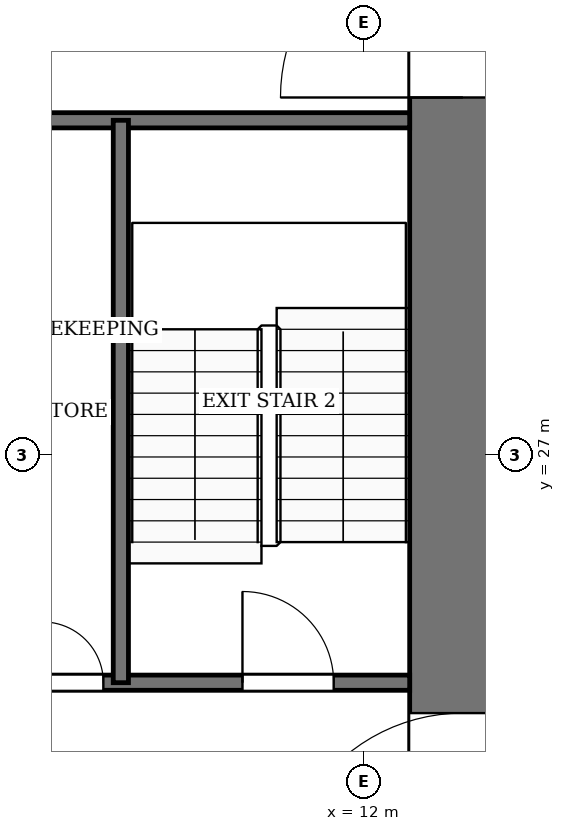
"""IFC4 building model, lengths in metres.
Left out: names, types, materials, properties, quantities, classifications, styles, units other than length and angle.
Written with IfcOpenShell. Run it as: python <this file> out.ifc"""

import sys

from ifc_helpers import new_model, si_unit, direction, frame, frame_2d, origin, place, context, subcontext, project, spatial, rectangle, extrude, element, fill, save


model = new_model("IFC4")
c1 = context("Model", 3, precision=1e-05, world=origin(), true_north=direction((0.0, 1.0)))
c2 = subcontext(c1, "Body", "Model", "MODEL_VIEW")
j1 = project(units=[si_unit("LENGTHUNIT", "METRE"), si_unit("PLANEANGLEUNIT", "RADIAN")], contexts=[c1])
p1 = place(None, origin())
s1 = spatial("IfcSite", under=j1, at=p1, CompositionType="ELEMENT")
p2 = place(p1, origin())
s2 = spatial("IfcBuilding", under=s1, at=p2, CompositionType="ELEMENT")
p3 = place(p2, frame((0.0, 0.0, 54.0)))
s3 = spatial("IfcBuildingStorey", under=s2, at=p3, CompositionType="ELEMENT", Elevation=54.0)
p4 = place(p3, frame((13.3, 18.4, -0.13), z_axis=(0.0, 0.0, 1.0), x_axis=(0.0, 1.0, 0.0)))
e1 = element("IfcWall", 1, at=p4, inside=s3, PredefinedType="SHEAR", context=c2, shape_type="SweptSolid", body=[
    extrude(rectangle(XDim=19.2, YDim=1.4, at=frame_2d((9.6, 0.0))), origin(), (0.0, 0.0, 1.0), 3.88),
])
p5 = place(p4, frame((2.8, 0.0, 0.13)))
e2 = element("IfcOpeningElement", 2, at=p5, cuts=e1, PredefinedType="OPENING", context=c2, shape_type="SweptSolid", body=[
    extrude(rectangle(XDim=2.4, YDim=2.4, at=frame_2d((1.2, 1.2))), frame((0.0, 0.71, 0.0), z_axis=(0.0, -1.0, 0.0), x_axis=(1.0, 0.0, 0.0)), (0.0, 0.0, 1.0), 1.42),
])
p6 = place(p4, frame((13.3, 0.0, 0.13)))
e3 = element("IfcOpeningElement", 3, at=p6, cuts=e1, PredefinedType="OPENING", context=c2, shape_type="SweptSolid", body=[
    extrude(rectangle(XDim=2.4, YDim=2.4, at=frame_2d((1.2, 1.2))), frame((0.0, 0.71, 0.0), z_axis=(0.0, -1.0, 0.0), x_axis=(1.0, 0.0, 0.0)), (0.0, 0.0, 1.0), 1.42),
])
p7 = place(p3, frame((6.0, 24.0, 0.0), z_axis=(0.0, 0.0, 1.0), x_axis=(1.0, 0.0, 0.0)))
e4 = element("IfcWall", 4, at=p7, inside=s3, PredefinedType="PARTITIONING", context=c2, shape_type="SweptSolid", body=[
    extrude(rectangle(XDim=6.6, YDim=0.2, at=frame_2d((3.3, 0.0))), origin(), (0.0, 0.0, 1.0), 3.75),
])
p8 = place(p7, frame((0.27, 0.0, 0.0)))
e5 = element("IfcOpeningElement", 5, at=p8, cuts=e4, PredefinedType="OPENING", context=c2, shape_type="SweptSolid", body=[
    extrude(rectangle(XDim=1.0, YDim=2.1, at=frame_2d((0.5, 1.05))), frame((0.0, 0.11, 0.0), z_axis=(0.0, -1.0, 0.0), x_axis=(1.0, 0.0, 0.0)), (0.0, 0.0, 1.0), 0.22),
])
p9 = place(p7, frame((1.77, 0.0, 0.0)))
e6 = element("IfcOpeningElement", 6, at=p9, cuts=e4, PredefinedType="OPENING", context=c2, shape_type="SweptSolid", body=[
    extrude(rectangle(XDim=0.8, YDim=2.1, at=frame_2d((0.4, 1.05))), frame((0.0, 0.11, 0.0), z_axis=(0.0, -1.0, 0.0), x_axis=(1.0, 0.0, 0.0)), (0.0, 0.0, 1.0), 0.22),
])
p10 = place(p7, frame((4.4, 0.0, 0.0)))
e7 = element("IfcOpeningElement", 7, at=p10, cuts=e4, PredefinedType="OPENING", context=c2, shape_type="SweptSolid", body=[
    extrude(rectangle(XDim=1.2, YDim=2.2, at=frame_2d((0.6, 1.1))), frame((0.0, 0.11, 0.0), z_axis=(0.0, -1.0, 0.0), x_axis=(1.0, 0.0, 0.0)), (0.0, 0.0, 1.0), 0.22),
])
p11 = place(p3, frame((6.0, 31.4, 0.0), z_axis=(0.0, 0.0, 1.0), x_axis=(1.0, 0.0, 0.0)))
e8 = element("IfcWall", 8, at=p11, inside=s3, PredefinedType="PARTITIONING", context=c2, shape_type="SweptSolid", body=[
    extrude(rectangle(XDim=6.6, YDim=0.2, at=frame_2d((3.3, 0.0))), origin(), (0.0, 0.0, 1.0), 3.75),
])
p12 = place(p3, frame((8.8, 24.0, 0.0), z_axis=(0.0, 0.0, 1.0), x_axis=(0.0, 1.0, 0.0)))
e9 = element("IfcWall", 9, at=p12, inside=s3, PredefinedType="PARTITIONING", context=c2, shape_type="SweptSolid", body=[
    extrude(rectangle(XDim=7.4, YDim=0.2, at=frame_2d((3.7, 0.0))), origin(), (0.0, 0.0, 1.0), 3.75),
])
p13 = place(p9, origin())
e10 = element("IfcDoor", 10, at=p13, inside=s3, OperationType="SINGLE_SWING_LEFT", PredefinedType="DOOR", context=c2, shape_type="SweptSolid", body=[
    extrude(rectangle(XDim=0.8, YDim=2.1, at=frame_2d((0.4, 1.05))), frame((0.0, 0.025, 0.0), z_axis=(0.0, -1.0, 0.0), x_axis=(1.0, 0.0, 0.0)), (0.0, 0.0, 1.0), 0.05),
])
fill(e6, e10)
p14 = place(p10, origin())
e11 = element("IfcDoor", 11, at=p14, inside=s3, OperationType="SINGLE_SWING_RIGHT", PredefinedType="DOOR", context=c2, shape_type="SweptSolid", body=[
    extrude(rectangle(XDim=1.2, YDim=2.2, at=frame_2d((0.6, 1.1))), frame((0.0, 0.025, 0.0), z_axis=(0.0, -1.0, 0.0), x_axis=(1.0, 0.0, 0.0)), (0.0, 0.0, 1.0), 0.05),
])
fill(e7, e11)
p15 = place(p5, origin())
e12 = element("IfcDoor", 12, at=p15, inside=s3, OperationType="DOUBLE_DOOR_SINGLE_SWING", PredefinedType="DOOR", context=c2, shape_type="SweptSolid", body=[
    extrude(rectangle(XDim=2.4, YDim=2.4, at=frame_2d((1.2, 1.2))), frame((0.0, 0.025, 0.0), z_axis=(0.0, -1.0, 0.0), x_axis=(1.0, 0.0, 0.0)), (0.0, 0.0, 1.0), 0.05),
])
fill(e2, e12)
p16 = place(p6, origin())
e13 = element("IfcDoor", 13, at=p16, inside=s3, OperationType="DOUBLE_DOOR_SINGLE_SWING", PredefinedType="DOOR", context=c2, shape_type="SweptSolid", body=[
    extrude(rectangle(XDim=2.4, YDim=2.4, at=frame_2d((1.2, 1.2))), frame((0.0, 0.025, 0.0), z_axis=(0.0, -1.0, 0.0), x_axis=(1.0, 0.0, 0.0)), (0.0, 0.0, 1.0), 0.05),
])
fill(e3, e13)
save(model, sys.argv[1])
